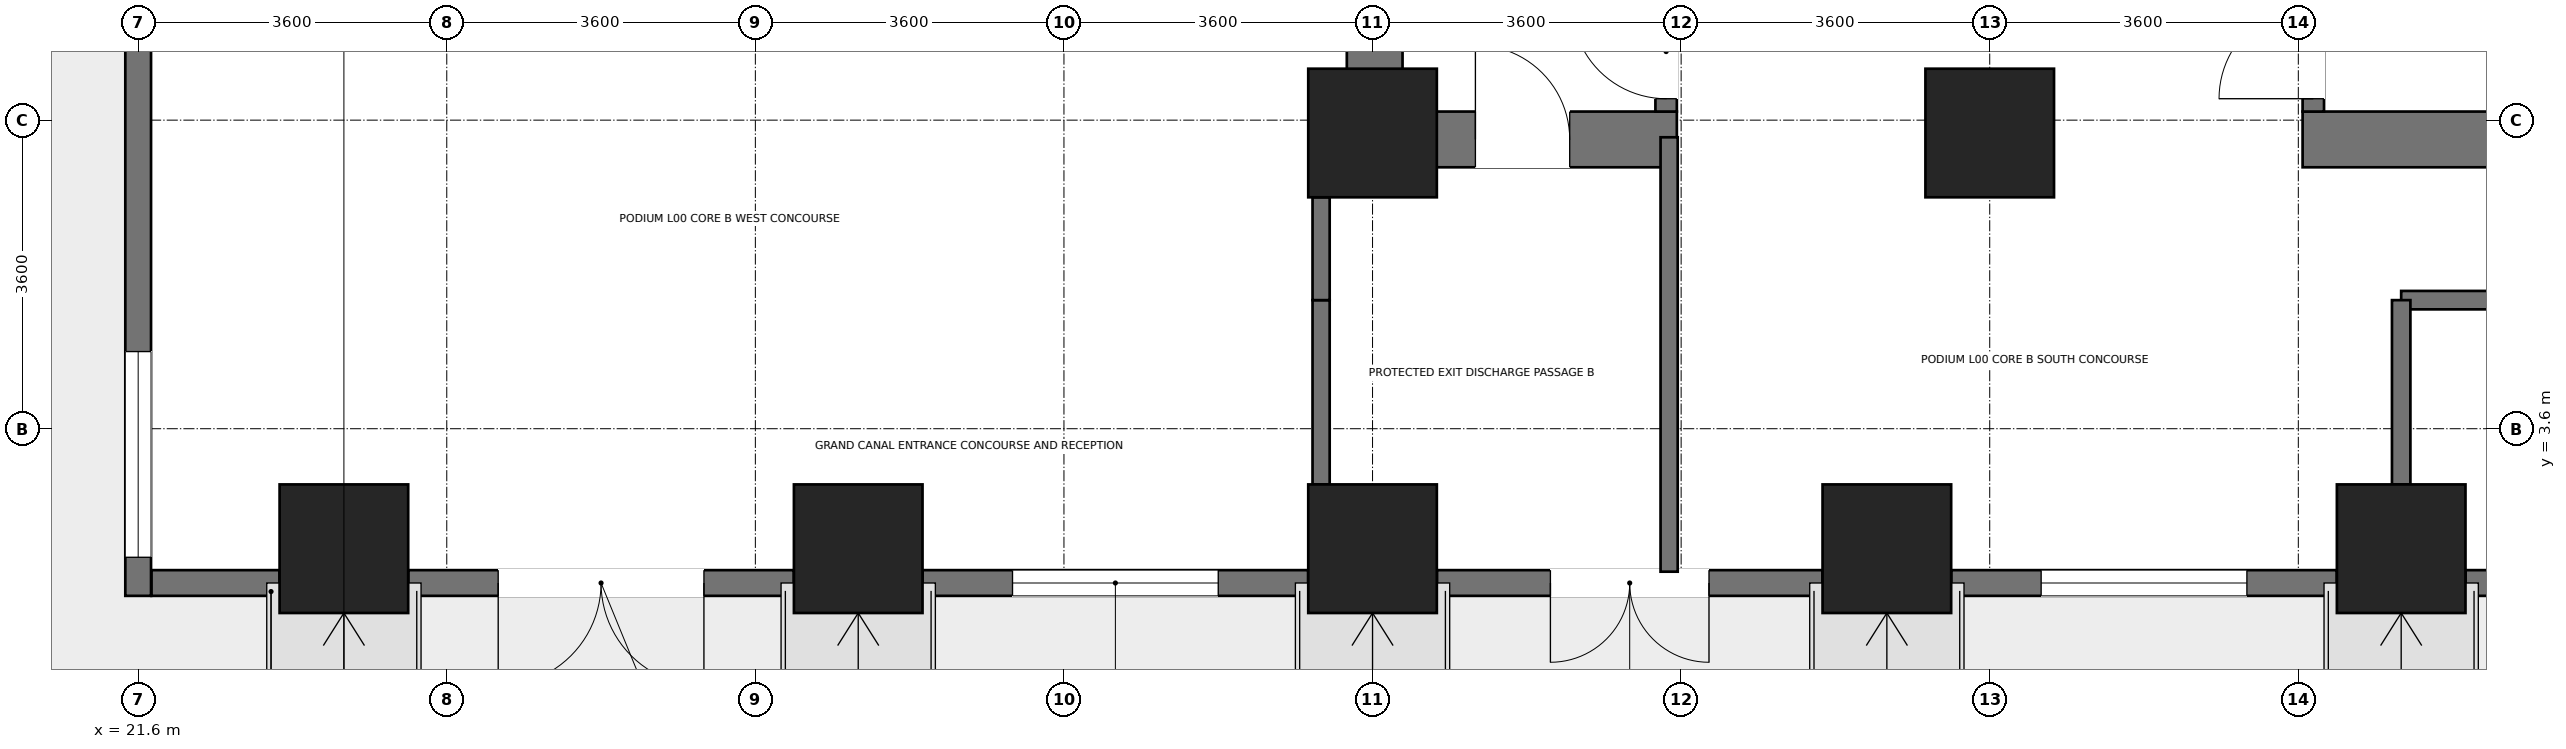
"""IFC4 building model, lengths in metres.
Left out: names, types, materials, properties, quantities, classifications, styles, units other than length and angle.
Written with IfcOpenShell. Run it as: python <this file> out.ifc"""

import sys

from ifc_helpers import new_model, si_unit, direction, frame, frame_2d, origin, origin_2d, place, context, subcontext, project, spatial, rectangle, extrude, source, transform, mapped, element, fill, save


model = new_model("IFC4")
c1 = context("Model", 3, precision=1e-05, world=origin(), true_north=direction((0.0, 1.0)))
c2 = subcontext(c1, "Body", "Model", "MODEL_VIEW")
j1 = project(units=[si_unit("LENGTHUNIT", "METRE"), si_unit("PLANEANGLEUNIT", "RADIAN")], contexts=[c1])
p1 = place(None, origin())
s1 = spatial("IfcSite", under=j1, at=p1, CompositionType="ELEMENT")
p2 = place(p1, origin())
s2 = spatial("IfcBuilding", under=s1, at=p2, CompositionType="ELEMENT")
p3 = place(p2, origin())
s3 = spatial("IfcBuildingStorey", under=s2, at=p3, CompositionType="ELEMENT", Elevation=0.0)
p4 = place(p3, frame((36.025, 6.65, 0.0), z_axis=(0.0, 0.0, 1.0), x_axis=(0.0, 1.0, 0.0)))
e1 = element("IfcWall", 1, at=p4, inside=s3, PredefinedType="SHEAR", context=c2, shape_type="SweptSolid", body=[
    extrude(rectangle(XDim=8.3, YDim=0.65, at=frame_2d((4.15, 0.0))), origin(), (0.0, 0.0, 1.0), 5.12),
])
p5 = place(p3, frame((36.35, 6.975, 0.0), z_axis=(0.0, 0.0, 1.0), x_axis=(1.0, 0.0, 0.0)))
e2 = element("IfcWall", 2, at=p5, inside=s3, PredefinedType="SHEAR", context=c2, shape_type="SweptSolid", body=[
    extrude(rectangle(XDim=3.2, YDim=0.65, at=frame_2d((1.6, 0.0))), origin(), (0.0, 0.0, 1.0), 5.12),
])
p6 = place(p5, frame((0.85, 0.0, 0.0)))
e3 = element("IfcOpeningElement", 3, at=p6, cuts=e2, PredefinedType="OPENING", context=c2, shape_type="SweptSolid", body=[
    extrude(rectangle(XDim=1.1, YDim=2.08, at=frame_2d((0.55, 1.04))), frame((0.0, 0.335, 0.0), z_axis=(0.0, -1.0, 0.0), x_axis=(1.0, 0.0, 0.0)), (0.0, 0.0, 1.0), 0.67),
])
p7 = place(p3, frame((46.85, 6.975, 0.0), z_axis=(0.0, 0.0, 1.0), x_axis=(1.0, 0.0, 0.0)))
e4 = element("IfcWall", 4, at=p7, inside=s3, PredefinedType="SHEAR", context=c2, shape_type="SweptSolid", body=[
    extrude(rectangle(XDim=3.2, YDim=0.65, at=frame_2d((1.6, 0.0))), origin(), (0.0, 0.0, 1.0), 5.12),
])
p8 = place(p3, frame((39.425, 7.3, 0.0), z_axis=(0.0, 0.0, 1.0), x_axis=(0.0, 1.0, 0.0)))
e5 = element("IfcWall", 5, at=p8, inside=s3, PredefinedType="SHEAR", context=c2, shape_type="SweptSolid", body=[
    extrude(rectangle(XDim=7.0, YDim=0.25, at=frame_2d((3.5, 0.0))), origin(), (0.0, 0.0, 1.0), 5.12),
])
p9 = place(p8, frame((0.15, 0.0, 0.0)))
e6 = element("IfcOpeningElement", 6, at=p9, cuts=e5, PredefinedType="OPENING", context=c2, shape_type="SweptSolid", body=[
    extrude(rectangle(XDim=1.1, YDim=2.08, at=frame_2d((0.55, 1.04))), frame((0.0, 0.135, 0.0), z_axis=(0.0, -1.0, 0.0), x_axis=(1.0, 0.0, 0.0)), (0.0, 0.0, 1.0), 0.27),
])
p10 = place(p3, frame((46.975, 7.3, 0.0), z_axis=(0.0, 0.0, 1.0), x_axis=(0.0, 1.0, 0.0)))
e7 = element("IfcWall", 7, at=p10, inside=s3, PredefinedType="SHEAR", context=c2, shape_type="SweptSolid", body=[
    extrude(rectangle(XDim=7.0, YDim=0.25, at=frame_2d((3.5, 0.0))), origin(), (0.0, 0.0, 1.0), 5.12),
])
p11 = place(p10, frame((0.15, 0.0, 0.0)))
e8 = element("IfcOpeningElement", 8, at=p11, cuts=e7, PredefinedType="OPENING", context=c2, shape_type="SweptSolid", body=[
    extrude(rectangle(XDim=1.1, YDim=2.08, at=frame_2d((0.55, 1.04))), frame((0.0, 0.135, 0.0), z_axis=(0.0, -1.0, 0.0), x_axis=(1.0, 0.0, 0.0)), (0.0, 0.0, 1.0), 0.27),
])
m1 = source(origin(), c2, "Body", "SweptSolid", [
    extrude(rectangle(XDim=1.5, YDim=1.5, at=origin_2d()), origin(), (0.0, 0.0, 1.0), 5.4),
])
for number, where, z_axis, x_axis in (
    (9, (36.0, 7.05, 0.0), (0.0, 0.0, 1.0), (1.0, 0.0, 0.0)),
    (10, (43.2, 7.05, 0.0), (0.0, 0.0, 1.0), (1.0, 0.0, 0.0)),
    (11, (48.0, 2.2, 0.0), (0.0, 0.0, 1.0), (1.0, 0.0, 0.0)),
    (12, (42.0, 2.2, 0.0), (0.0, 0.0, 1.0), (1.0, 0.0, 0.0)),
    (13, (36.0, 2.2, 0.0), (0.0, 0.0, 1.0), (1.0, 0.0, 0.0)),
    (14, (30.0, 2.2, 0.0), (0.0, 0.0, 1.0), (1.0, 0.0, 0.0)),
    (15, (24.0, 2.2, 0.0), (0.0, 0.0, 1.0), (1.0, 0.0, 0.0)),
):
    element("IfcColumn", number, at=place(p3, frame(where, z_axis=z_axis, x_axis=x_axis)), inside=s3, PredefinedType="COLUMN", context=c2, shape_type="MappedRepresentation", body=[
        mapped(m1, transform((0.0, 0.0, 0.0), x_axis=(1.0, 0.0, 0.0), y_axis=(0.0, 1.0, 0.0), z_axis=(0.0, 0.0, 1.0), scale=1.0)),
    ])
p12 = place(p3, frame((23.249, 1.8, 0.0), z_axis=(0.0, 0.0, 1.0), x_axis=(-1.0, 0.0, 0.0)))
e16 = element("IfcWall", 16, at=p12, inside=s3, PredefinedType="STANDARD", context=c2, shape_type="SweptSolid", body=[
    extrude(rectangle(XDim=1.494, YDim=0.3, at=frame_2d((0.747, 0.0))), origin(), (0.0, 0.0, 1.0), 5.1),
])
p13 = place(p3, frame((29.249, 1.8, 0.0), z_axis=(0.0, 0.0, 1.0), x_axis=(-1.0, 0.0, 0.0)))
e17 = element("IfcWall", 17, at=p13, inside=s3, PredefinedType="STANDARD", context=c2, shape_type="SweptSolid", body=[
    extrude(rectangle(XDim=4.498, YDim=0.3, at=frame_2d((2.249, 0.0))), origin(), (0.0, 0.0, 1.0), 5.1),
])
p14 = place(p13, frame((1.049, 0.0, 0.0)))
e18 = element("IfcOpeningElement", 18, at=p14, cuts=e17, PredefinedType="OPENING", context=c2, shape_type="SweptSolid", body=[
    extrude(rectangle(XDim=2.4, YDim=2.6, at=frame_2d((1.2, 1.3))), frame((0.0, 0.16, 0.0), z_axis=(0.0, -1.0, 0.0), x_axis=(1.0, 0.0, 0.0)), (0.0, 0.0, 1.0), 0.32),
])
p15 = place(p3, frame((35.249, 1.8, 0.0), z_axis=(0.0, 0.0, 1.0), x_axis=(-1.0, 0.0, 0.0)))
e19 = element("IfcWall", 19, at=p15, inside=s3, PredefinedType="STANDARD", context=c2, shape_type="SweptSolid", body=[
    extrude(rectangle(XDim=4.498, YDim=0.3, at=frame_2d((2.249, 0.0))), origin(), (0.0, 0.0, 1.0), 5.1),
])
p16 = place(p15, frame((1.049, 0.0, 0.9)))
e20 = element("IfcOpeningElement", 20, at=p16, cuts=e19, PredefinedType="OPENING", context=c2, shape_type="SweptSolid", body=[
    extrude(rectangle(XDim=2.4, YDim=2.5, at=frame_2d((1.2, 1.25))), frame((0.0, 0.16, 0.0), z_axis=(0.0, -1.0, 0.0), x_axis=(1.0, 0.0, 0.0)), (0.0, 0.0, 1.0), 0.32),
])
p17 = place(p3, frame((41.249, 1.8, 0.0), z_axis=(0.0, 0.0, 1.0), x_axis=(-1.0, 0.0, 0.0)))
e21 = element("IfcWall", 21, at=p17, inside=s3, PredefinedType="STANDARD", context=c2, shape_type="SweptSolid", body=[
    extrude(rectangle(XDim=4.498, YDim=0.3, at=frame_2d((2.249, 0.0))), origin(), (0.0, 0.0, 1.0), 5.1),
])
p18 = place(p17, frame((1.324, 0.0, 0.0)))
e22 = element("IfcOpeningElement", 22, at=p18, cuts=e21, PredefinedType="OPENING", context=c2, shape_type="SweptSolid", body=[
    extrude(rectangle(XDim=1.85, YDim=2.25, at=frame_2d((0.925, 1.125))), frame((0.0, 0.16, 0.0), z_axis=(0.0, -1.0, 0.0), x_axis=(1.0, 0.0, 0.0)), (0.0, 0.0, 1.0), 0.32),
])
p19 = place(p3, frame((47.249, 1.8, 0.0), z_axis=(0.0, 0.0, 1.0), x_axis=(-1.0, 0.0, 0.0)))
e23 = element("IfcWall", 23, at=p19, inside=s3, PredefinedType="STANDARD", context=c2, shape_type="SweptSolid", body=[
    extrude(rectangle(XDim=4.498, YDim=0.3, at=frame_2d((2.249, 0.0))), origin(), (0.0, 0.0, 1.0), 5.1),
])
p20 = place(p19, frame((1.049, 0.0, 0.9)))
e24 = element("IfcOpeningElement", 24, at=p20, cuts=e23, PredefinedType="OPENING", context=c2, shape_type="SweptSolid", body=[
    extrude(rectangle(XDim=2.4, YDim=2.5, at=frame_2d((1.2, 1.25))), frame((0.0, 0.16, 0.0), z_axis=(0.0, -1.0, 0.0), x_axis=(1.0, 0.0, 0.0)), (0.0, 0.0, 1.0), 0.32),
])
p21 = place(p3, frame((55.249, 1.8, 0.0), z_axis=(0.0, 0.0, 1.0), x_axis=(-1.0, 0.0, 0.0)))
e25 = element("IfcWall", 25, at=p21, inside=s3, PredefinedType="STANDARD", context=c2, shape_type="SweptSolid", body=[
    extrude(rectangle(XDim=6.498, YDim=0.3, at=frame_2d((3.249, 0.0))), origin(), (0.0, 0.0, 1.0), 5.1),
])
p22 = place(p21, frame((2.324, 0.0, 0.0)))
e26 = element("IfcOpeningElement", 26, at=p22, cuts=e25, PredefinedType="OPENING", context=c2, shape_type="SweptSolid", body=[
    extrude(rectangle(XDim=1.85, YDim=2.25, at=frame_2d((0.925, 1.125))), frame((0.0, 0.16, 0.0), z_axis=(0.0, -1.0, 0.0), x_axis=(1.0, 0.0, 0.0)), (0.0, 0.0, 1.0), 0.32),
])
p23 = place(p3, frame((21.6, 1.65, 0.0), z_axis=(0.0, 0.0, 1.0), x_axis=(0.0, 1.0, 0.0)))
e27 = element("IfcWall", 27, at=p23, inside=s3, PredefinedType="STANDARD", context=c2, shape_type="SweptSolid", body=[
    extrude(rectangle(XDim=16.5, YDim=0.3, at=frame_2d((8.25, 0.0))), origin(), (0.0, 0.0, 1.0), 5.1),
])
p24 = place(p23, frame((13.125, 0.0, 0.0)))
e28 = element("IfcOpeningElement", 28, at=p24, cuts=e27, PredefinedType="OPENING", context=c2, shape_type="SweptSolid", body=[
    extrude(rectangle(XDim=1.85, YDim=2.25, at=frame_2d((0.925, 1.125))), frame((0.0, 0.16, 0.0), z_axis=(0.0, -1.0, 0.0), x_axis=(1.0, 0.0, 0.0)), (0.0, 0.0, 1.0), 0.32),
])
p25 = place(p23, frame((0.45, 0.0, 0.9)))
e29 = element("IfcOpeningElement", 29, at=p25, cuts=e27, PredefinedType="OPENING", context=c2, shape_type="SweptSolid", body=[
    extrude(rectangle(XDim=2.4, YDim=2.5, at=frame_2d((1.2, 1.25))), frame((0.0, 0.16, 0.0), z_axis=(0.0, -1.0, 0.0), x_axis=(1.0, 0.0, 0.0)), (0.0, 0.0, 1.0), 0.32),
])
p26 = place(p23, frame((7.05, 0.0, 0.9)))
e30 = element("IfcOpeningElement", 30, at=p26, cuts=e27, PredefinedType="OPENING", context=c2, shape_type="SweptSolid", body=[
    extrude(rectangle(XDim=2.4, YDim=2.5, at=frame_2d((1.2, 1.25))), frame((0.0, 0.16, 0.0), z_axis=(0.0, -1.0, 0.0), x_axis=(1.0, 0.0, 0.0)), (0.0, 0.0, 1.0), 0.32),
])
p27 = place(p3, frame((39.46, 1.932, 0.0), z_axis=(0.0, 0.0, 1.0), x_axis=(0.0, 1.0, 0.0)))
e31 = element("IfcWall", 31, at=p27, inside=s3, PredefinedType="PARTITIONING", context=c2, shape_type="SweptSolid", body=[
    extrude(rectangle(XDim=5.068, YDim=0.2, at=frame_2d((2.534, 0.0))), origin(), (0.0, 0.0, 1.0), 5.1),
])
p28 = place(p3, frame((35.4, 2.95, 0.0), z_axis=(0.0, 0.0, 1.0), x_axis=(0.0, 1.0, 0.0)))
e32 = element("IfcWall", 32, at=p28, inside=s3, PredefinedType="PARTITIONING", context=c2, shape_type="SweptSolid", body=[
    extrude(rectangle(XDim=2.15, YDim=0.2, at=frame_2d((1.075, 0.0))), origin(), (0.0, 0.0, 1.0), 5.1),
])
p29 = place(p3, frame((35.4, 5.1, 0.0), z_axis=(0.0, 0.0, 1.0), x_axis=(0.0, 1.0, 0.0)))
e33 = element("IfcWall", 33, at=p29, inside=s3, PredefinedType="PARTITIONING", context=c2, shape_type="SweptSolid", body=[
    extrude(rectangle(XDim=1.2, YDim=0.2, at=frame_2d((0.6, 0.0))), origin(), (0.0, 0.0, 1.0), 5.1),
])
p30 = place(p3, frame((48.0, 5.1, 0.0), z_axis=(0.0, 0.0, 1.0), x_axis=(1.0, 0.0, 0.0)))
e34 = element("IfcWall", 34, at=p30, inside=s3, PredefinedType="PARTITIONING", context=c2, shape_type="SweptSolid", body=[
    extrude(rectangle(XDim=13.2, YDim=0.215, at=frame_2d((6.6, 0.0))), origin(), (0.0, 0.0, 1.0), 5.1),
])
p31 = place(p30, frame((3.524, 0.0, 0.0)))
e35 = element("IfcOpeningElement", 35, at=p31, cuts=e34, PredefinedType="OPENING", context=c2, shape_type="SweptSolid", body=[
    extrude(rectangle(XDim=1.4, YDim=2.15, at=frame_2d((0.7, 1.075))), frame((0.0, 0.118, 0.0), z_axis=(0.0, -1.0, 0.0), x_axis=(1.0, 0.0, 0.0)), (0.0, 0.0, 1.0), 0.235),
])
p32 = place(p3, frame((48.0, 2.95, 0.0), z_axis=(0.0, 0.0, 1.0), x_axis=(0.0, 1.0, 0.0)))
e36 = element("IfcWall", 36, at=p32, inside=s3, PredefinedType="PARTITIONING", context=c2, shape_type="SweptSolid", body=[
    extrude(rectangle(XDim=2.15, YDim=0.215, at=frame_2d((1.075, 0.0))), origin(), (0.0, 0.0, 1.0), 5.1),
])
p33 = place(p14, origin())
e37 = element("IfcDoor", 37, at=p33, inside=s3, OperationType="DOUBLE_DOOR_SINGLE_SWING", PredefinedType="DOOR", context=c2, shape_type="SweptSolid", body=[
    extrude(rectangle(XDim=2.4, YDim=2.6, at=frame_2d((1.2, 1.3))), frame((0.0, 0.025, 0.0), z_axis=(0.0, -1.0, 0.0), x_axis=(1.0, 0.0, 0.0)), (0.0, 0.0, 1.0), 0.05),
])
fill(e18, e37)
p34 = place(p16, origin())
e38 = element("IfcWindow", 38, at=p34, inside=s3, PartitioningType="SINGLE_PANEL", PredefinedType="WINDOW", context=c2, shape_type="SweptSolid", body=[
    extrude(rectangle(XDim=2.4, YDim=2.5, at=frame_2d((1.2, 1.25))), frame((0.0, 0.03, 0.0), z_axis=(0.0, -1.0, 0.0), x_axis=(1.0, 0.0, 0.0)), (0.0, 0.0, 1.0), 0.06),
])
fill(e20, e38)
p35 = place(p18, origin())
e39 = element("IfcDoor", 39, at=p35, inside=s3, OperationType="DOUBLE_DOOR_SINGLE_SWING", PredefinedType="DOOR", context=c2, shape_type="SweptSolid", body=[
    extrude(rectangle(XDim=1.85, YDim=2.25, at=frame_2d((0.925, 1.125))), frame((0.0, 0.025, 0.0), z_axis=(0.0, -1.0, 0.0), x_axis=(1.0, 0.0, 0.0)), (0.0, 0.0, 1.0), 0.05),
])
fill(e22, e39)
p36 = place(p20, origin())
e40 = element("IfcWindow", 40, at=p36, inside=s3, PartitioningType="SINGLE_PANEL", PredefinedType="WINDOW", context=c2, shape_type="SweptSolid", body=[
    extrude(rectangle(XDim=2.4, YDim=2.5, at=frame_2d((1.2, 1.25))), frame((0.0, 0.03, 0.0), z_axis=(0.0, -1.0, 0.0), x_axis=(1.0, 0.0, 0.0)), (0.0, 0.0, 1.0), 0.06),
])
fill(e24, e40)
p37 = place(p25, origin())
e41 = element("IfcWindow", 41, at=p37, inside=s3, PartitioningType="SINGLE_PANEL", PredefinedType="WINDOW", context=c2, shape_type="SweptSolid", body=[
    extrude(rectangle(XDim=2.4, YDim=2.5, at=frame_2d((1.2, 1.25))), frame((0.0, 0.03, 0.0), z_axis=(0.0, -1.0, 0.0), x_axis=(1.0, 0.0, 0.0)), (0.0, 0.0, 1.0), 0.06),
])
fill(e29, e41)
p38 = place(p9, origin())
e42 = element("IfcDoor", 42, at=p38, inside=s3, OperationType="SINGLE_SWING_RIGHT", PredefinedType="DOOR", context=c2, shape_type="SweptSolid", body=[
    extrude(rectangle(XDim=1.1, YDim=2.08, at=frame_2d((0.55, 1.04))), frame((0.0, 0.025, 0.0), z_axis=(0.0, -1.0, 0.0), x_axis=(1.0, 0.0, 0.0)), (0.0, 0.0, 1.0), 0.05),
])
fill(e6, e42)
p39 = place(p6, origin())
e43 = element("IfcDoor", 43, at=p39, inside=s3, OperationType="SINGLE_SWING_LEFT", PredefinedType="DOOR", context=c2, shape_type="SweptSolid", body=[
    extrude(rectangle(XDim=1.1, YDim=2.08, at=frame_2d((0.55, 1.04))), frame((0.0, 0.025, 0.0), z_axis=(0.0, -1.0, 0.0), x_axis=(1.0, 0.0, 0.0)), (0.0, 0.0, 1.0), 0.05),
])
fill(e3, e43)
p40 = place(p11, origin())
e44 = element("IfcDoor", 44, at=p40, inside=s3, OperationType="SINGLE_SWING_LEFT", PredefinedType="DOOR", context=c2, shape_type="SweptSolid", body=[
    extrude(rectangle(XDim=1.1, YDim=2.08, at=frame_2d((0.55, 1.04))), frame((0.0, 0.025, 0.0), z_axis=(0.0, -1.0, 0.0), x_axis=(1.0, 0.0, 0.0)), (0.0, 0.0, 1.0), 0.05),
])
fill(e8, e44)
save(model, sys.argv[1])
